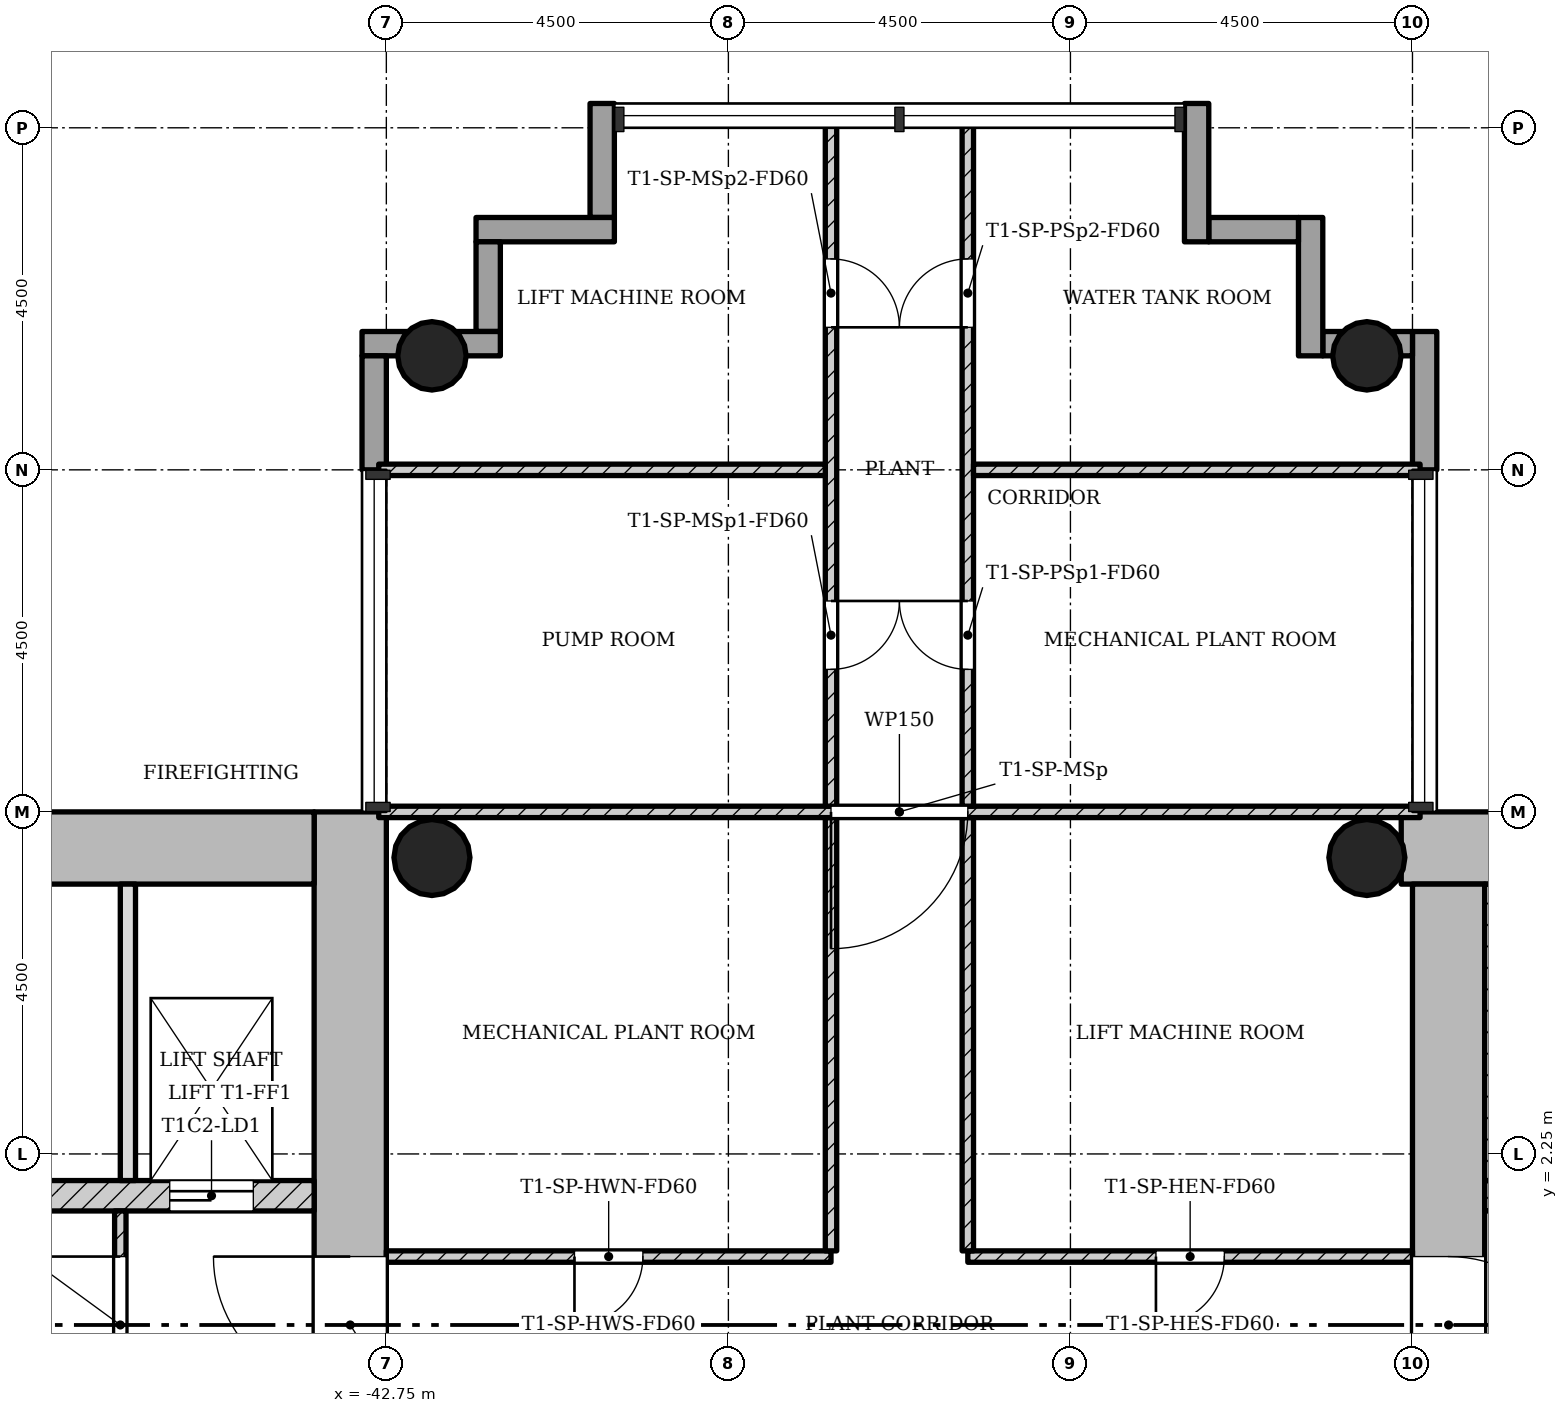
"""IFC4 building model, lengths in metres.
Left out: names, types, materials, properties, quantities, classifications, styles, units other than length and angle.
Written with IfcOpenShell. Run it as: python <this file> out.ifc"""

import sys

from ifc_helpers import new_model, si_unit, direction, frame, frame_2d, origin, origin_2d, place, context, subcontext, project, spatial, rectangle, hollow_circle, extrude, element, fill, save


model = new_model("IFC4")
c1 = context("Model", 3, precision=1e-05, world=origin(), true_north=direction((0.0, 1.0)))
c2 = subcontext(c1, "Body", "Model", "MODEL_VIEW")
j1 = project(units=[si_unit("LENGTHUNIT", "METRE"), si_unit("PLANEANGLEUNIT", "RADIAN")], contexts=[c1])
p1 = place(None, origin())
s1 = spatial("IfcSite", under=j1, at=p1, CompositionType="ELEMENT")
p2 = place(p1, origin())
s2 = spatial("IfcBuilding", under=s1, at=p2, CompositionType="ELEMENT")
p3 = place(p2, frame((0.0, 0.0, 124.2)))
s3 = spatial("IfcBuildingStorey", under=s2, at=p3, CompositionType="ELEMENT", Elevation=124.2)
p4 = place(p3, frame((-20.702, 6.275, 0.0), z_axis=(0.0, 0.0, 1.0), x_axis=(-1.0, 0.0, 0.0)))
e1 = element("IfcWall", 1, at=p4, inside=s3, PredefinedType="SHEAR", context=c2, shape_type="SweptSolid", body=[
    extrude(rectangle(XDim=8.696, YDim=0.95, at=frame_2d((4.348, 0.0))), origin(), (0.0, 0.0, 1.0), 4.5),
])
p5 = place(p3, frame((-28.775, 5.8, 0.0), z_axis=(0.0, 0.0, 1.0), x_axis=(0.0, -1.0, 0.0)))
e2 = element("IfcWall", 2, at=p5, inside=s3, PredefinedType="SHEAR", context=c2, shape_type="SweptSolid", body=[
    extrude(rectangle(XDim=12.55, YDim=0.95, at=frame_2d((6.275, 0.0))), origin(), (0.0, 0.0, 1.0), 4.5),
])
p6 = place(p5, frame((4.9, 0.0, 0.0)))
e3 = element("IfcOpeningElement", 3, at=p6, cuts=e2, PredefinedType="OPENING", context=c2, shape_type="SweptSolid", body=[
    extrude(rectangle(XDim=1.8, YDim=2.1, at=frame_2d((0.9, 1.05))), frame((0.0, 0.485, 0.0), z_axis=(0.0, -1.0, 0.0), x_axis=(1.0, 0.0, 0.0)), (0.0, 0.0, 1.0), 0.97),
])
p7 = place(p3, frame((-28.3, 1.7, 0.0), z_axis=(0.0, 0.0, 1.0), x_axis=(1.0, 0.0, 0.0)))
e4 = element("IfcWall", 4, at=p7, inside=s3, PredefinedType="SHEAR", context=c2, shape_type="SweptSolid", body=[
    extrude(rectangle(XDim=7.1, YDim=0.4, at=frame_2d((3.55, 0.0))), origin(), (0.0, 0.0, 1.0), 4.5),
])
p8 = place(p7, frame((0.7, 0.0, 0.0)))
e5 = element("IfcOpeningElement", 5, at=p8, cuts=e4, PredefinedType="OPENING", context=c2, shape_type="SweptSolid", body=[
    extrude(rectangle(XDim=0.9, YDim=2.1, at=frame_2d((0.45, 1.05))), frame((0.0, 0.21, 0.0), z_axis=(0.0, -1.0, 0.0), x_axis=(1.0, 0.0, 0.0)), (0.0, 0.0, 1.0), 0.42),
])
p9 = place(p3, frame((-43.225, -5.8, 0.0), z_axis=(0.0, 0.0, 1.0), x_axis=(0.0, 1.0, 0.0)))
e6 = element("IfcWall", 6, at=p9, inside=s3, PredefinedType="SHEAR", context=c2, shape_type="SweptSolid", body=[
    extrude(rectangle(XDim=12.55, YDim=0.95, at=frame_2d((6.275, 0.0))), origin(), (0.0, 0.0, 1.0), 4.5),
])
p10 = place(p9, frame((4.9, 0.0, 0.0)))
e7 = element("IfcOpeningElement", 7, at=p10, cuts=e6, PredefinedType="OPENING", context=c2, shape_type="SweptSolid", body=[
    extrude(rectangle(XDim=1.8, YDim=2.1, at=frame_2d((0.9, 1.05))), frame((0.0, 0.485, 0.0), z_axis=(0.0, -1.0, 0.0), x_axis=(1.0, 0.0, 0.0)), (0.0, 0.0, 1.0), 0.97),
])
p11 = place(p3, frame((-43.7, 6.275, 0.0), z_axis=(0.0, 0.0, 1.0), x_axis=(-1.0, 0.0, 0.0)))
e8 = element("IfcWall", 8, at=p11, inside=s3, PredefinedType="SHEAR", context=c2, shape_type="SweptSolid", body=[
    extrude(rectangle(XDim=8.05, YDim=0.95, at=frame_2d((4.025, 0.0))), origin(), (0.0, 0.0, 1.0), 4.5),
])
p12 = place(p3, frame((-50.8, 1.7, 0.0), z_axis=(0.0, 0.0, 1.0), x_axis=(1.0, 0.0, 0.0)))
e9 = element("IfcWall", 9, at=p12, inside=s3, PredefinedType="SHEAR", context=c2, shape_type="SweptSolid", body=[
    extrude(rectangle(XDim=7.1, YDim=0.4, at=frame_2d((3.55, 0.0))), origin(), (0.0, 0.0, 1.0), 4.5),
])
p13 = place(p12, frame((5.2, 0.0, 0.0)))
e10 = element("IfcOpeningElement", 10, at=p13, cuts=e9, PredefinedType="OPENING", context=c2, shape_type="SweptSolid", body=[
    extrude(rectangle(XDim=1.1, YDim=2.1, at=frame_2d((0.55, 1.05))), frame((0.0, 0.21, 0.0), z_axis=(0.0, -1.0, 0.0), x_axis=(1.0, 0.0, 0.0)), (0.0, 0.0, 1.0), 0.42),
])
for number, where, z_axis, x_axis in (
    (11, (-29.85, 12.75, 0.0), (0.0, 0.0, 1.0), (1.0, 0.0, 0.0)),
    (12, (-42.15, 12.75, 0.0), (0.0, 0.0, 1.0), (1.0, 0.0, 0.0)),
):
    element("IfcColumn", number, at=place(p3, frame(where, z_axis=z_axis, x_axis=x_axis)), inside=s3, PredefinedType="COLUMN", context=c2, shape_type="SweptSolid", body=[
        extrude(hollow_circle(Radius=0.45, WallThickness=0.032, at=origin_2d()), origin(), (0.0, 0.0, 1.0), 4.5),
    ])
for number, where, z_axis, x_axis in (
    (13, (-29.85, 6.15, 0.0), (0.0, 0.0, 1.0), (1.0, 0.0, 0.0)),
    (14, (-42.15, 6.15, 0.0), (0.0, 0.0, 1.0), (1.0, 0.0, 0.0)),
):
    element("IfcColumn", number, at=place(p3, frame(where, z_axis=z_axis, x_axis=x_axis)), inside=s3, PredefinedType="COLUMN", context=c2, shape_type="SweptSolid", body=[
        extrude(hollow_circle(Radius=0.5, WallThickness=0.036, at=origin_2d()), origin(), (0.0, 0.0, 1.0), 4.5),
    ])
p14 = place(p3, frame((-29.09, 11.25, -0.3), z_axis=(0.0, 0.0, 1.0), x_axis=(0.0, 1.0, 0.0)))
e15 = element("IfcWall", 15, at=p14, inside=s3, PredefinedType="STANDARD", context=c2, shape_type="SweptSolid", body=[
    extrude(rectangle(XDim=1.82, YDim=0.32, at=frame_2d((0.91, 0.0))), origin(), (0.0, 0.0, 1.0), 4.5),
])
p15 = place(p3, frame((-29.25, 12.91, -0.3), z_axis=(0.0, 0.0, 1.0), x_axis=(-1.0, 0.0, 0.0)))
e16 = element("IfcWall", 16, at=p15, inside=s3, PredefinedType="STANDARD", context=c2, shape_type="SweptSolid", body=[
    extrude(rectangle(XDim=1.18, YDim=0.32, at=frame_2d((0.59, 0.0))), origin(), (0.0, 0.0, 1.0), 4.5),
])
p16 = place(p3, frame((-30.59, 12.75, -0.3), z_axis=(0.0, 0.0, 1.0), x_axis=(0.0, 1.0, 0.0)))
e17 = element("IfcWall", 17, at=p16, inside=s3, PredefinedType="STANDARD", context=c2, shape_type="SweptSolid", body=[
    extrude(rectangle(XDim=1.82, YDim=0.32, at=frame_2d((0.91, 0.0))), origin(), (0.0, 0.0, 1.0), 4.5),
])
p17 = place(p3, frame((-30.75, 14.41, -0.3), z_axis=(0.0, 0.0, 1.0), x_axis=(-1.0, 0.0, 0.0)))
e18 = element("IfcWall", 18, at=p17, inside=s3, PredefinedType="STANDARD", context=c2, shape_type="SweptSolid", body=[
    extrude(rectangle(XDim=1.18, YDim=0.32, at=frame_2d((0.59, 0.0))), origin(), (0.0, 0.0, 1.0), 4.5),
])
p18 = place(p3, frame((-32.09, 14.25, -0.3), z_axis=(0.0, 0.0, 1.0), x_axis=(0.0, 1.0, 0.0)))
e19 = element("IfcWall", 19, at=p18, inside=s3, PredefinedType="STANDARD", context=c2, shape_type="SweptSolid", body=[
    extrude(rectangle(XDim=1.82, YDim=0.32, at=frame_2d((0.91, 0.0))), origin(), (0.0, 0.0, 1.0), 4.5),
])
p19 = place(p3, frame((-39.91, 16.07, -0.3), z_axis=(0.0, 0.0, 1.0), x_axis=(0.0, -1.0, 0.0)))
e20 = element("IfcWall", 20, at=p19, inside=s3, PredefinedType="STANDARD", context=c2, shape_type="SweptSolid", body=[
    extrude(rectangle(XDim=1.5, YDim=0.32, at=frame_2d((0.75, 0.0))), origin(), (0.0, 0.0, 1.0), 4.5),
])
p20 = place(p3, frame((-39.75, 14.41, -0.3), z_axis=(0.0, 0.0, 1.0), x_axis=(-1.0, 0.0, 0.0)))
e21 = element("IfcWall", 21, at=p20, inside=s3, PredefinedType="STANDARD", context=c2, shape_type="SweptSolid", body=[
    extrude(rectangle(XDim=1.82, YDim=0.32, at=frame_2d((0.91, 0.0))), origin(), (0.0, 0.0, 1.0), 4.5),
])
p21 = place(p3, frame((-41.41, 14.25, -0.3), z_axis=(0.0, 0.0, 1.0), x_axis=(0.0, -1.0, 0.0)))
e22 = element("IfcWall", 22, at=p21, inside=s3, PredefinedType="STANDARD", context=c2, shape_type="SweptSolid", body=[
    extrude(rectangle(XDim=1.18, YDim=0.32, at=frame_2d((0.59, 0.0))), origin(), (0.0, 0.0, 1.0), 4.5),
])
p22 = place(p3, frame((-41.25, 12.91, -0.3), z_axis=(0.0, 0.0, 1.0), x_axis=(-1.0, 0.0, 0.0)))
e23 = element("IfcWall", 23, at=p22, inside=s3, PredefinedType="STANDARD", context=c2, shape_type="SweptSolid", body=[
    extrude(rectangle(XDim=1.82, YDim=0.32, at=frame_2d((0.91, 0.0))), origin(), (0.0, 0.0, 1.0), 4.5),
])
p23 = place(p3, frame((-42.91, 12.75, -0.3), z_axis=(0.0, 0.0, 1.0), x_axis=(0.0, -1.0, 0.0)))
e24 = element("IfcWall", 24, at=p23, inside=s3, PredefinedType="STANDARD", context=c2, shape_type="SweptSolid", body=[
    extrude(rectangle(XDim=1.5, YDim=0.32, at=frame_2d((0.75, 0.0))), origin(), (0.0, 0.0, 1.0), 4.5),
])
p24 = place(p3, frame((-46.25, 1.5, 0.0), z_axis=(0.0, 0.0, 1.0), x_axis=(0.0, -1.0, 0.0)))
e25 = element("IfcWall", 25, at=p24, inside=s3, PredefinedType="PARTITIONING", context=c2, shape_type="SweptSolid", body=[
    extrude(rectangle(XDim=3.0, YDim=0.15, at=frame_2d((1.5, 0.0))), origin(), (0.0, 0.0, 1.0), 4.1),
])
p25 = place(p24, frame((0.6, 0.0, 0.0)))
e26 = element("IfcOpeningElement", 26, at=p25, cuts=e25, PredefinedType="OPENING", context=c2, shape_type="SweptSolid", body=[
    extrude(rectangle(XDim=1.8, YDim=2.1, at=frame_2d((0.9, 1.05))), frame((0.0, 0.085, 0.0), z_axis=(0.0, -1.0, 0.0), x_axis=(1.0, 0.0, 0.0)), (0.0, 0.0, 1.0), 0.17),
])
p26 = place(p3, frame((-46.15, 5.8, 0.0), z_axis=(0.0, 0.0, 1.0), x_axis=(0.0, -1.0, 0.0)))
e27 = element("IfcWall", 27, at=p26, inside=s3, PredefinedType="SOLIDWALL", context=c2, shape_type="SweptSolid", body=[
    extrude(rectangle(XDim=3.9, YDim=0.2, at=frame_2d((1.95, 0.0))), origin(), (0.0, 0.0, 1.0), 4.1),
])
p27 = place(p3, frame((-35.1, 0.9, 0.0), z_axis=(0.0, 0.0, 1.0), x_axis=(1.0, 0.0, 0.0)))
e28 = element("IfcWall", 28, at=p27, inside=s3, PredefinedType="PARTITIONING", context=c2, shape_type="SweptSolid", body=[
    extrude(rectangle(XDim=5.85, YDim=0.15, at=frame_2d((2.925, 0.0))), origin(), (0.0, 0.0, 1.0), 4.1),
])
p28 = place(p27, frame((2.475, 0.0, 0.0)))
e29 = element("IfcOpeningElement", 29, at=p28, cuts=e28, PredefinedType="OPENING", context=c2, shape_type="SweptSolid", body=[
    extrude(rectangle(XDim=0.9, YDim=2.1, at=frame_2d((0.45, 1.05))), frame((0.0, 0.085, 0.0), z_axis=(0.0, -1.0, 0.0), x_axis=(1.0, 0.0, 0.0)), (0.0, 0.0, 1.0), 0.17),
])
p29 = place(p3, frame((-35.1, 0.975, 0.0), z_axis=(0.0, 0.0, 1.0), x_axis=(0.0, 1.0, 0.0)))
e30 = element("IfcWall", 30, at=p29, inside=s3, PredefinedType="PARTITIONING", context=c2, shape_type="SweptSolid", body=[
    extrude(rectangle(XDim=5.7, YDim=0.15, at=frame_2d((2.85, 0.0))), origin(), (0.0, 0.0, 1.0), 4.1),
])
p30 = place(p3, frame((-42.75, 0.9, 0.0), z_axis=(0.0, 0.0, 1.0), x_axis=(1.0, 0.0, 0.0)))
e31 = element("IfcWall", 31, at=p30, inside=s3, PredefinedType="PARTITIONING", context=c2, shape_type="SweptSolid", body=[
    extrude(rectangle(XDim=5.85, YDim=0.15, at=frame_2d((2.925, 0.0))), origin(), (0.0, 0.0, 1.0), 4.1),
])
p31 = place(p30, frame((2.475, 0.0, 0.0)))
e32 = element("IfcOpeningElement", 32, at=p31, cuts=e31, PredefinedType="OPENING", context=c2, shape_type="SweptSolid", body=[
    extrude(rectangle(XDim=0.9, YDim=2.1, at=frame_2d((0.45, 1.05))), frame((0.0, 0.085, 0.0), z_axis=(0.0, -1.0, 0.0), x_axis=(1.0, 0.0, 0.0)), (0.0, 0.0, 1.0), 0.17),
])
p32 = place(p3, frame((-36.9, 0.975, 0.0), z_axis=(0.0, 0.0, 1.0), x_axis=(0.0, 1.0, 0.0)))
e33 = element("IfcWall", 33, at=p32, inside=s3, PredefinedType="PARTITIONING", context=c2, shape_type="SweptSolid", body=[
    extrude(rectangle(XDim=5.7, YDim=0.15, at=frame_2d((2.85, 0.0))), origin(), (0.0, 0.0, 1.0), 4.1),
])
p33 = place(p3, frame((-42.85, 6.75, 0.0), z_axis=(0.0, 0.0, 1.0), x_axis=(1.0, 0.0, 0.0)))
e34 = element("IfcWall", 34, at=p33, inside=s3, PredefinedType="PARTITIONING", context=c2, shape_type="SweptSolid", body=[
    extrude(rectangle(XDim=13.7, YDim=0.15, at=frame_2d((6.85, 0.0))), origin(), (0.0, 0.0, 1.0), 4.1),
])
p34 = place(p33, frame((5.95, 0.0, 0.0)))
e35 = element("IfcOpeningElement", 35, at=p34, cuts=e34, PredefinedType="OPENING", context=c2, shape_type="SweptSolid", body=[
    extrude(rectangle(XDim=1.8, YDim=2.1, at=frame_2d((0.9, 1.05))), frame((0.0, 0.085, 0.0), z_axis=(0.0, -1.0, 0.0), x_axis=(1.0, 0.0, 0.0)), (0.0, 0.0, 1.0), 0.17),
])
p35 = place(p3, frame((-35.1, 6.825, 0.0), z_axis=(0.0, 0.0, 1.0), x_axis=(0.0, 1.0, 0.0)))
e36 = element("IfcWall", 36, at=p35, inside=s3, PredefinedType="PARTITIONING", context=c2, shape_type="SweptSolid", body=[
    extrude(rectangle(XDim=9.025, YDim=0.15, at=frame_2d((4.513, 0.0))), origin(), (0.0, 0.0, 1.0), 4.1),
])
p36 = place(p35, frame((1.8, 0.0, 0.0)))
e37 = element("IfcOpeningElement", 37, at=p36, cuts=e36, PredefinedType="OPENING", context=c2, shape_type="SweptSolid", body=[
    extrude(rectangle(XDim=0.9, YDim=2.1, at=frame_2d((0.45, 1.05))), frame((0.0, 0.085, 0.0), z_axis=(0.0, -1.0, 0.0), x_axis=(1.0, 0.0, 0.0)), (0.0, 0.0, 1.0), 0.17),
])
p37 = place(p35, frame((6.3, 0.0, 0.0)))
e38 = element("IfcOpeningElement", 38, at=p37, cuts=e36, PredefinedType="OPENING", context=c2, shape_type="SweptSolid", body=[
    extrude(rectangle(XDim=0.9, YDim=2.1, at=frame_2d((0.45, 1.05))), frame((0.0, 0.085, 0.0), z_axis=(0.0, -1.0, 0.0), x_axis=(1.0, 0.0, 0.0)), (0.0, 0.0, 1.0), 0.17),
])
p38 = place(p3, frame((-35.025, 11.25, 0.0), z_axis=(0.0, 0.0, 1.0), x_axis=(1.0, 0.0, 0.0)))
e39 = element("IfcWall", 39, at=p38, inside=s3, PredefinedType="PARTITIONING", context=c2, shape_type="SweptSolid", body=[
    extrude(rectangle(XDim=5.875, YDim=0.15, at=frame_2d((2.938, 0.0))), origin(), (0.0, 0.0, 1.0), 4.1),
])
p39 = place(p3, frame((-36.9, 6.825, 0.0), z_axis=(0.0, 0.0, 1.0), x_axis=(0.0, 1.0, 0.0)))
e40 = element("IfcWall", 40, at=p39, inside=s3, PredefinedType="PARTITIONING", context=c2, shape_type="SweptSolid", body=[
    extrude(rectangle(XDim=9.025, YDim=0.15, at=frame_2d((4.513, 0.0))), origin(), (0.0, 0.0, 1.0), 4.1),
])
p40 = place(p39, frame((1.8, 0.0, 0.0)))
e41 = element("IfcOpeningElement", 41, at=p40, cuts=e40, PredefinedType="OPENING", context=c2, shape_type="SweptSolid", body=[
    extrude(rectangle(XDim=0.9, YDim=2.1, at=frame_2d((0.45, 1.05))), frame((0.0, 0.085, 0.0), z_axis=(0.0, -1.0, 0.0), x_axis=(1.0, 0.0, 0.0)), (0.0, 0.0, 1.0), 0.17),
])
p41 = place(p39, frame((6.3, 0.0, 0.0)))
e42 = element("IfcOpeningElement", 42, at=p41, cuts=e40, PredefinedType="OPENING", context=c2, shape_type="SweptSolid", body=[
    extrude(rectangle(XDim=0.9, YDim=2.1, at=frame_2d((0.45, 1.05))), frame((0.0, 0.085, 0.0), z_axis=(0.0, -1.0, 0.0), x_axis=(1.0, 0.0, 0.0)), (0.0, 0.0, 1.0), 0.17),
])
p42 = place(p3, frame((-36.975, 11.25, 0.0), z_axis=(0.0, 0.0, 1.0), x_axis=(-1.0, 0.0, 0.0)))
e43 = element("IfcWall", 43, at=p42, inside=s3, PredefinedType="PARTITIONING", context=c2, shape_type="SweptSolid", body=[
    extrude(rectangle(XDim=5.875, YDim=0.15, at=frame_2d((2.938, 0.0))), origin(), (0.0, 0.0, 1.0), 4.1),
])
p43 = place(p3, frame((-28.175, 1.9, 0.0), z_axis=(0.0, 0.0, 1.0), x_axis=(0.0, 1.0, 0.0)))
e44 = element("IfcWall", 44, at=p43, inside=s3, PredefinedType="SHEAR", context=c2, shape_type="SweptSolid", body=[
    extrude(rectangle(XDim=3.9, YDim=0.25, at=frame_2d((1.95, 0.0))), origin(), (0.0, 0.0, 1.0), 4.5),
])
p44 = place(p25, origin())
e45 = element("IfcDoor", 45, at=p44, inside=s3, OperationType="SINGLE_SWING_LEFT", PredefinedType="DOOR", context=c2, shape_type="SweptSolid", body=[
    extrude(rectangle(XDim=1.8, YDim=2.1, at=frame_2d((0.9, 1.05))), frame((0.0, 0.025, 0.0), z_axis=(0.0, -1.0, 0.0), x_axis=(1.0, 0.0, 0.0)), (0.0, 0.0, 1.0), 0.05),
])
fill(e26, e45)
p45 = place(p28, origin())
e46 = element("IfcDoor", 46, at=p45, inside=s3, OperationType="SINGLE_SWING_LEFT", PredefinedType="DOOR", context=c2, shape_type="SweptSolid", body=[
    extrude(rectangle(XDim=0.9, YDim=2.1, at=frame_2d((0.45, 1.05))), frame((0.0, 0.025, 0.0), z_axis=(0.0, -1.0, 0.0), x_axis=(1.0, 0.0, 0.0)), (0.0, 0.0, 1.0), 0.05),
])
fill(e29, e46)
p46 = place(p31, origin())
e47 = element("IfcDoor", 47, at=p46, inside=s3, OperationType="SINGLE_SWING_LEFT", PredefinedType="DOOR", context=c2, shape_type="SweptSolid", body=[
    extrude(rectangle(XDim=0.9, YDim=2.1, at=frame_2d((0.45, 1.05))), frame((0.0, 0.025, 0.0), z_axis=(0.0, -1.0, 0.0), x_axis=(1.0, 0.0, 0.0)), (0.0, 0.0, 1.0), 0.05),
])
fill(e32, e47)
p47 = place(p34, origin())
e48 = element("IfcDoor", 48, at=p47, inside=s3, OperationType="SINGLE_SWING_LEFT", PredefinedType="DOOR", context=c2, shape_type="SweptSolid", body=[
    extrude(rectangle(XDim=1.8, YDim=2.1, at=frame_2d((0.9, 1.05))), frame((0.0, 0.025, 0.0), z_axis=(0.0, -1.0, 0.0), x_axis=(1.0, 0.0, 0.0)), (0.0, 0.0, 1.0), 0.05),
])
fill(e35, e48)
p48 = place(p36, origin())
e49 = element("IfcDoor", 49, at=p48, inside=s3, OperationType="SINGLE_SWING_LEFT", PredefinedType="DOOR", context=c2, shape_type="SweptSolid", body=[
    extrude(rectangle(XDim=0.9, YDim=2.1, at=frame_2d((0.45, 1.05))), frame((0.0, 0.025, 0.0), z_axis=(0.0, -1.0, 0.0), x_axis=(1.0, 0.0, 0.0)), (0.0, 0.0, 1.0), 0.05),
])
fill(e37, e49)
p49 = place(p37, origin())
e50 = element("IfcDoor", 50, at=p49, inside=s3, OperationType="SINGLE_SWING_RIGHT", PredefinedType="DOOR", context=c2, shape_type="SweptSolid", body=[
    extrude(rectangle(XDim=0.9, YDim=2.1, at=frame_2d((0.45, 1.05))), frame((0.0, 0.025, 0.0), z_axis=(0.0, -1.0, 0.0), x_axis=(1.0, 0.0, 0.0)), (0.0, 0.0, 1.0), 0.05),
])
fill(e38, e50)
p50 = place(p40, origin())
e51 = element("IfcDoor", 51, at=p50, inside=s3, OperationType="SINGLE_SWING_RIGHT", PredefinedType="DOOR", context=c2, shape_type="SweptSolid", body=[
    extrude(rectangle(XDim=0.9, YDim=2.1, at=frame_2d((0.45, 1.05))), frame((0.0, 0.025, 0.0), z_axis=(0.0, -1.0, 0.0), x_axis=(1.0, 0.0, 0.0)), (0.0, 0.0, 1.0), 0.05),
])
fill(e41, e51)
p51 = place(p41, origin())
e52 = element("IfcDoor", 52, at=p51, inside=s3, OperationType="SINGLE_SWING_LEFT", PredefinedType="DOOR", context=c2, shape_type="SweptSolid", body=[
    extrude(rectangle(XDim=0.9, YDim=2.1, at=frame_2d((0.45, 1.05))), frame((0.0, 0.025, 0.0), z_axis=(0.0, -1.0, 0.0), x_axis=(1.0, 0.0, 0.0)), (0.0, 0.0, 1.0), 0.05),
])
fill(e42, e52)
p52 = place(p6, origin())
e53 = element("IfcDoor", 53, at=p52, inside=s3, OperationType="SINGLE_SWING_LEFT", PredefinedType="DOOR", context=c2, shape_type="SweptSolid", body=[
    extrude(rectangle(XDim=1.8, YDim=2.1, at=frame_2d((0.9, 1.05))), frame((0.0, 0.025, 0.0), z_axis=(0.0, -1.0, 0.0), x_axis=(1.0, 0.0, 0.0)), (0.0, 0.0, 1.0), 0.05),
])
fill(e3, e53)
p53 = place(p13, origin())
e54 = element("IfcDoor", 54, at=p53, inside=s3, OperationType="SLIDING_TO_LEFT", PredefinedType="DOOR", context=c2, shape_type="SweptSolid", body=[
    extrude(rectangle(XDim=1.1, YDim=2.1, at=frame_2d((0.55, 1.05))), frame((0.0, 0.025, 0.0), z_axis=(0.0, -1.0, 0.0), x_axis=(1.0, 0.0, 0.0)), (0.0, 0.0, 1.0), 0.05),
])
fill(e10, e54)
p54 = place(p10, origin())
e55 = element("IfcDoor", 55, at=p54, inside=s3, OperationType="SINGLE_SWING_LEFT", PredefinedType="DOOR", context=c2, shape_type="SweptSolid", body=[
    extrude(rectangle(XDim=1.8, YDim=2.1, at=frame_2d((0.9, 1.05))), frame((0.0, 0.025, 0.0), z_axis=(0.0, -1.0, 0.0), x_axis=(1.0, 0.0, 0.0)), (0.0, 0.0, 1.0), 0.05),
])
fill(e7, e55)
save(model, sys.argv[1])
